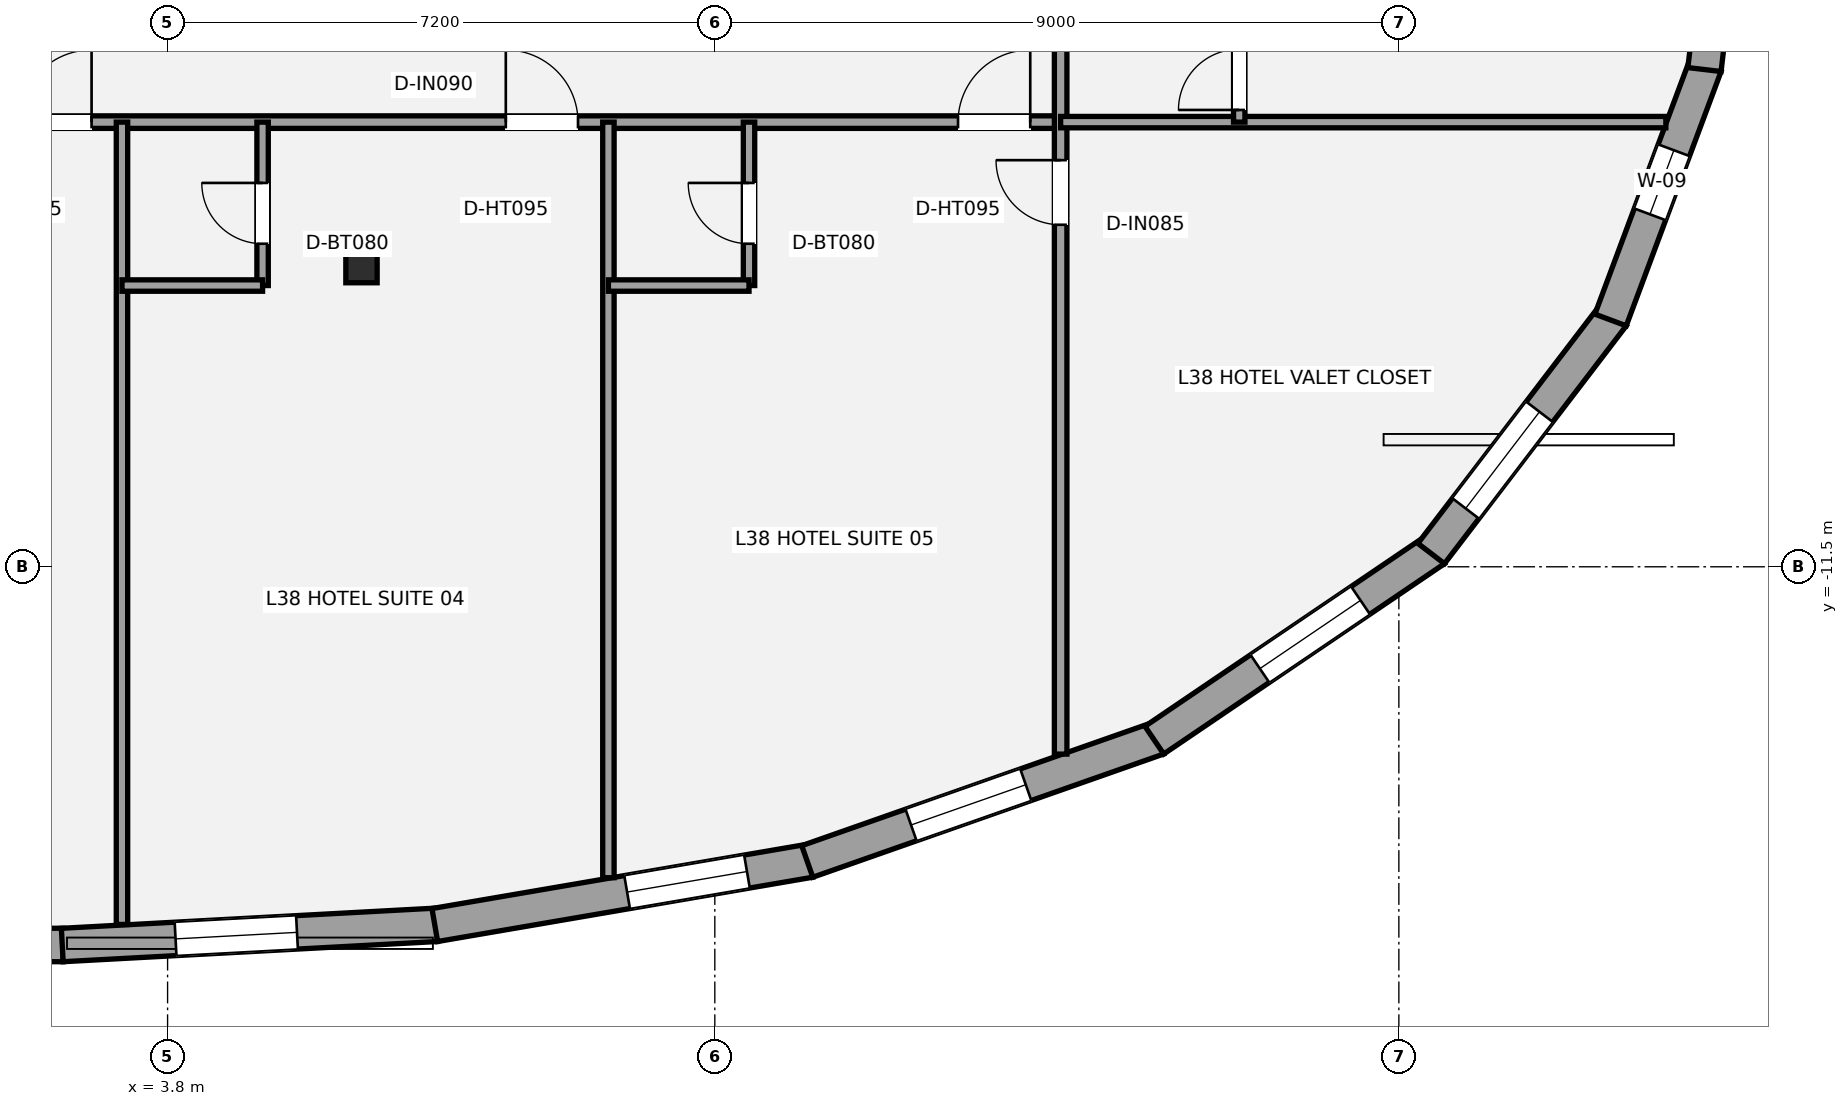
"""IFC4 building model, lengths in metres.
Left out: names, types, materials, properties, quantities, classifications, styles, units other than length and angle.
Written with IfcOpenShell. Run it as: python <this file> out.ifc"""

import sys

from ifc_helpers import new_model, si_unit, direction, frame, frame_2d, origin, origin_2d, place, context, subcontext, project, spatial, rectangle, i_section, extrude, element, fill, save


model = new_model("IFC4")
c1 = context("Model", 3, precision=1e-05, world=origin(), true_north=direction((0.0, 1.0)))
c2 = subcontext(c1, "Body", "Model", "MODEL_VIEW")
j1 = project(units=[si_unit("LENGTHUNIT", "METRE"), si_unit("PLANEANGLEUNIT", "RADIAN")], contexts=[c1])
p1 = place(None, origin())
s1 = spatial("IfcSite", under=j1, at=p1, CompositionType="ELEMENT")
p2 = place(p1, origin())
s2 = spatial("IfcBuilding", under=s1, at=p2, CompositionType="ELEMENT")
p3 = place(p2, frame((0.0, 0.0, 143.8)))
s3 = spatial("IfcBuildingStorey", under=s2, at=p3, CompositionType="ELEMENT", Elevation=143.8)
p4 = place(p3, frame((6.351, -7.546, 0.0), z_axis=(0.0, 0.0, 1.0), x_axis=(1.0, 0.0, 0.0)))
e1 = element("IfcColumn", 1, at=p4, inside=s3, PredefinedType="COLUMN", context=c2, shape_type="SweptSolid", body=[
    extrude(i_section(OverallWidth=0.412, OverallDepth=0.435, WebThickness=0.036, FlangeThickness=0.057, at=origin_2d()), origin(), (0.0, 0.0, 1.0), 3.2),
])
p5 = place(p3, frame((2.426, -16.476, 0.0), z_axis=(0.0, 0.0, 1.0), x_axis=(-1.0, 0.0, 0.0)))
e2 = element("IfcWall", 2, at=p5, inside=s3, PredefinedType="STANDARD", context=c2, shape_type="SweptSolid", body=[
    extrude(rectangle(XDim=4.852, YDim=0.44, at=frame_2d((2.426, 0.0))), origin(), (0.0, 0.0, 1.0), 2.315),
])
p6 = place(p5, frame((1.429, 0.0, 0.58)))
e3 = element("IfcOpeningElement", 3, at=p6, cuts=e2, PredefinedType="OPENING", context=c2, shape_type="SweptSolid", body=[
    extrude(rectangle(XDim=1.6, YDim=1.55, at=frame_2d((0.8, 0.775))), frame((0.0, 0.23, 0.0), z_axis=(0.0, -1.0, 0.0), x_axis=(1.0, 0.0, 0.0)), (0.0, 0.0, 1.0), 0.46),
])
p7 = place(p3, frame((7.341, -16.21, 0.0), z_axis=(0.0, 0.0, 1.0), x_axis=(-0.998547098553, -0.05388591627, 0.0)))
e4 = element("IfcWall", 4, at=p7, inside=s3, PredefinedType="STANDARD", context=c2, shape_type="SweptSolid", body=[
    extrude(rectangle(XDim=4.934, YDim=0.44, at=frame_2d((2.467, 0.0))), origin(), (0.0, 0.0, 1.0), 2.315),
])
p8 = place(p7, frame((1.841, 0.0, 0.58)))
e5 = element("IfcOpeningElement", 5, at=p8, cuts=e4, PredefinedType="OPENING", context=c2, shape_type="SweptSolid", body=[
    extrude(rectangle(XDim=1.6, YDim=1.55, at=frame_2d((0.8, 0.775))), frame((0.0, 0.23, 0.0), z_axis=(0.0, -1.0, 0.0), x_axis=(1.0, 0.0, 0.0)), (0.0, 0.0, 1.0), 0.46),
])
p9 = place(p3, frame((12.252, -15.367, 0.0), z_axis=(0.0, 0.0, 1.0), x_axis=(-0.985640803986, -0.168855575915, 0.0)))
e6 = element("IfcWall", 6, at=p9, inside=s3, PredefinedType="STANDARD", context=c2, shape_type="SweptSolid", body=[
    extrude(rectangle(XDim=5.009, YDim=0.44, at=frame_2d((2.504, 0.0))), origin(), (0.0, 0.0, 1.0), 2.315),
])
p10 = place(p9, frame((0.841, 0.0, 0.58)))
e7 = element("IfcOpeningElement", 7, at=p10, cuts=e6, PredefinedType="OPENING", context=c2, shape_type="SweptSolid", body=[
    extrude(rectangle(XDim=1.6, YDim=1.55, at=frame_2d((0.8, 0.775))), frame((0.0, 0.23, 0.0), z_axis=(0.0, -1.0, 0.0), x_axis=(1.0, 0.0, 0.0)), (0.0, 0.0, 1.0), 0.46),
])
p11 = place(p3, frame((16.833, -13.756, 0.0), z_axis=(0.0, 0.0, 1.0), x_axis=(-0.943528860281, -0.331290340662, 0.0)))
e8 = element("IfcWall", 8, at=p11, inside=s3, PredefinedType="STANDARD", context=c2, shape_type="SweptSolid", body=[
    extrude(rectangle(XDim=4.893, YDim=0.44, at=frame_2d((2.447, 0.0))), origin(), (0.0, 0.0, 1.0), 2.315),
])
p12 = place(p11, frame((1.846, 0.0, 0.58)))
e9 = element("IfcOpeningElement", 9, at=p12, cuts=e8, PredefinedType="OPENING", context=c2, shape_type="SweptSolid", body=[
    extrude(rectangle(XDim=1.6, YDim=1.55, at=frame_2d((0.8, 0.775))), frame((0.0, 0.23, 0.0), z_axis=(0.0, -1.0, 0.0), x_axis=(1.0, 0.0, 0.0)), (0.0, 0.0, 1.0), 0.46),
])
p13 = place(p3, frame((20.477, -11.277, 0.0), z_axis=(0.0, 0.0, 1.0), x_axis=(-0.827741657842, -0.561109390291, 0.0)))
e10 = element("IfcWall", 10, at=p13, inside=s3, PredefinedType="STANDARD", context=c2, shape_type="SweptSolid", body=[
    extrude(rectangle(XDim=4.463, YDim=0.44, at=frame_2d((2.231, 0.0))), origin(), (0.0, 0.0, 1.0), 2.315),
])
p14 = place(p13, frame((1.185, 0.0, 0.58)))
e11 = element("IfcOpeningElement", 11, at=p14, cuts=e10, PredefinedType="OPENING", context=c2, shape_type="SweptSolid", body=[
    extrude(rectangle(XDim=1.6, YDim=1.55, at=frame_2d((0.8, 0.775))), frame((0.0, 0.23, 0.0), z_axis=(0.0, -1.0, 0.0), x_axis=(1.0, 0.0, 0.0)), (0.0, 0.0, 1.0), 0.46),
])
p15 = place(p3, frame((22.817, -8.196, 0.0), z_axis=(0.0, 0.0, 1.0), x_axis=(-0.607215400231, -0.794537260122, 0.0)))
e12 = element("IfcWall", 12, at=p15, inside=s3, PredefinedType="STANDARD", context=c2, shape_type="SweptSolid", body=[
    extrude(rectangle(XDim=3.939, YDim=0.44, at=frame_2d((1.969, 0.0))), origin(), (0.0, 0.0, 1.0), 2.315),
])
p16 = place(p15, frame((1.592, 0.0, 0.58)))
e13 = element("IfcOpeningElement", 13, at=p16, cuts=e12, PredefinedType="OPENING", context=c2, shape_type="SweptSolid", body=[
    extrude(rectangle(XDim=1.6, YDim=1.55, at=frame_2d((0.8, 0.775))), frame((0.0, 0.23, 0.0), z_axis=(0.0, -1.0, 0.0), x_axis=(1.0, 0.0, 0.0)), (0.0, 0.0, 1.0), 0.46),
])
p17 = place(p3, frame((24.033, -4.907, 0.0), z_axis=(0.0, 0.0, 1.0), x_axis=(-0.349422124021, -0.936965409844, 0.0)))
e14 = element("IfcWall", 14, at=p17, inside=s3, PredefinedType="STANDARD", context=c2, shape_type="SweptSolid", body=[
    extrude(rectangle(XDim=3.571, YDim=0.44, at=frame_2d((1.786, 0.0))), origin(), (0.0, 0.0, 1.0), 2.315),
])
p18 = place(p17, frame((1.188, 0.0, 0.58)))
e15 = element("IfcOpeningElement", 15, at=p18, cuts=e14, PredefinedType="OPENING", context=c2, shape_type="SweptSolid", body=[
    extrude(rectangle(XDim=0.9, YDim=1.35, at=frame_2d((0.45, 0.675))), frame((0.0, 0.23, 0.0), z_axis=(0.0, -1.0, 0.0), x_axis=(1.0, 0.0, 0.0)), (0.0, 0.0, 1.0), 0.46),
])
p19 = place(p3, frame((24.413, -1.619, 0.0), z_axis=(0.0, 0.0, 1.0), x_axis=(-0.116605336518, -0.993178330158, 0.0)))
e16 = element("IfcWall", 16, at=p19, inside=s3, PredefinedType="STANDARD", context=c2, shape_type="SweptSolid", body=[
    extrude(rectangle(XDim=3.363, YDim=0.44, at=frame_2d((1.681, 0.0))), origin(), (0.0, 0.0, 1.0), 2.315),
])
p20 = place(p19, frame((1.417, 0.0, 0.58)))
e17 = element("IfcOpeningElement", 17, at=p20, cuts=e16, PredefinedType="OPENING", context=c2, shape_type="SweptSolid", body=[
    extrude(rectangle(XDim=1.6, YDim=1.55, at=frame_2d((0.8, 0.775))), frame((0.0, 0.23, 0.0), z_axis=(0.0, -1.0, 0.0), x_axis=(1.0, 0.0, 0.0)), (0.0, 0.0, 1.0), 0.46),
])
p21 = place(p3, frame((-15.55, -5.65, 0.0), z_axis=(0.0, 0.0, 1.0), x_axis=(1.0, 0.0, 0.0)))
e18 = element("IfcWall", 18, at=p21, inside=s3, PredefinedType="PARTITIONING", context=c2, shape_type="SweptSolid", body=[
    extrude(rectangle(XDim=31.1, YDim=0.165, at=frame_2d((15.55, 0.0))), origin(), (0.0, 0.0, 1.0), 2.398),
])
p22 = place(p21, frame((4.6, 0.0, 0.0)))
e19 = element("IfcOpeningElement", 19, at=p22, cuts=e18, PredefinedType="OPENING", context=c2, shape_type="SweptSolid", body=[
    extrude(rectangle(XDim=0.95, YDim=2.15, at=frame_2d((0.475, 1.075))), frame((0.0, 0.093, 0.0), z_axis=(0.0, -1.0, 0.0), x_axis=(1.0, 0.0, 0.0)), (0.0, 0.0, 1.0), 0.185),
])
p23 = place(p21, frame((11.0, 0.0, 0.0)))
e20 = element("IfcOpeningElement", 20, at=p23, cuts=e18, PredefinedType="OPENING", context=c2, shape_type="SweptSolid", body=[
    extrude(rectangle(XDim=0.95, YDim=2.15, at=frame_2d((0.475, 1.075))), frame((0.0, 0.093, 0.0), z_axis=(0.0, -1.0, 0.0), x_axis=(1.0, 0.0, 0.0)), (0.0, 0.0, 1.0), 0.185),
])
p24 = place(p21, frame((17.4, 0.0, 0.0)))
e21 = element("IfcOpeningElement", 21, at=p24, cuts=e18, PredefinedType="OPENING", context=c2, shape_type="SweptSolid", body=[
    extrude(rectangle(XDim=0.95, YDim=2.15, at=frame_2d((0.475, 1.075))), frame((0.0, 0.093, 0.0), z_axis=(0.0, -1.0, 0.0), x_axis=(1.0, 0.0, 0.0)), (0.0, 0.0, 1.0), 0.185),
])
p25 = place(p21, frame((23.8, 0.0, 0.0)))
e22 = element("IfcOpeningElement", 22, at=p25, cuts=e18, PredefinedType="OPENING", context=c2, shape_type="SweptSolid", body=[
    extrude(rectangle(XDim=0.95, YDim=2.15, at=frame_2d((0.475, 1.075))), frame((0.0, 0.093, 0.0), z_axis=(0.0, -1.0, 0.0), x_axis=(1.0, 0.0, 0.0)), (0.0, 0.0, 1.0), 0.185),
])
p26 = place(p21, frame((29.75, 0.0, 0.0)))
e23 = element("IfcOpeningElement", 23, at=p26, cuts=e18, PredefinedType="OPENING", context=c2, shape_type="SweptSolid", body=[
    extrude(rectangle(XDim=0.95, YDim=2.15, at=frame_2d((0.475, 1.075))), frame((0.0, 0.093, 0.0), z_axis=(0.0, -1.0, 0.0), x_axis=(1.0, 0.0, 0.0)), (0.0, 0.0, 1.0), 0.185),
])
p27 = place(p3, frame((15.55, -13.965, 0.0), z_axis=(0.0, 0.0, 1.0), x_axis=(0.0, 1.0, 0.0)))
e24 = element("IfcWall", 24, at=p27, inside=s3, PredefinedType="PARTITIONING", context=c2, shape_type="SweptSolid", body=[
    extrude(rectangle(XDim=21.515, YDim=0.165, at=frame_2d((10.757, 0.0))), origin(), (0.0, 0.0, 1.0), 2.473),
])
p28 = place(p27, frame((6.964, 0.0, 0.0)))
e25 = element("IfcOpeningElement", 25, at=p28, cuts=e24, PredefinedType="OPENING", context=c2, shape_type="SweptSolid", body=[
    extrude(rectangle(XDim=0.85, YDim=2.1, at=frame_2d((0.425, 1.05))), frame((0.0, 0.093, 0.0), z_axis=(0.0, -1.0, 0.0), x_axis=(1.0, 0.0, 0.0)), (0.0, 0.0, 1.0), 0.185),
])
p29 = place(p27, frame((11.014, 0.0, 0.0)))
e26 = element("IfcOpeningElement", 26, at=p29, cuts=e24, PredefinedType="OPENING", context=c2, shape_type="SweptSolid", body=[
    extrude(rectangle(XDim=0.95, YDim=2.15, at=frame_2d((0.475, 1.075))), frame((0.0, 0.093, 0.0), z_axis=(0.0, -1.0, 0.0), x_axis=(1.0, 0.0, 0.0)), (0.0, 0.0, 1.0), 0.185),
])
p30 = place(p27, frame((15.414, 0.0, 0.0)))
e27 = element("IfcOpeningElement", 27, at=p30, cuts=e24, PredefinedType="OPENING", context=c2, shape_type="SweptSolid", body=[
    extrude(rectangle(XDim=0.95, YDim=2.15, at=frame_2d((0.475, 1.075))), frame((0.0, 0.093, 0.0), z_axis=(0.0, -1.0, 0.0), x_axis=(1.0, 0.0, 0.0)), (0.0, 0.0, 1.0), 0.185),
])
p31 = place(p27, frame((20.165, 0.0, 0.0)))
e28 = element("IfcOpeningElement", 28, at=p31, cuts=e24, PredefinedType="OPENING", context=c2, shape_type="SweptSolid", body=[
    extrude(rectangle(XDim=0.95, YDim=2.15, at=frame_2d((0.475, 1.075))), frame((0.0, 0.093, 0.0), z_axis=(0.0, -1.0, 0.0), x_axis=(1.0, 0.0, 0.0)), (0.0, 0.0, 1.0), 0.185),
])
p32 = place(p3, frame((15.55, -5.65, 0.0), z_axis=(0.0, 0.0, 1.0), x_axis=(1.0, 0.0, 0.0)))
e29 = element("IfcWall", 29, at=p32, inside=s3, PredefinedType="PLUMBINGWALL", context=c2, shape_type="SweptSolid", body=[
    extrude(rectangle(XDim=7.963, YDim=0.15, at=frame_2d((3.981, 0.0))), origin(), (0.0, 0.0, 1.0), 2.473),
])
p33 = place(p3, frame((3.2, -16.205, 0.0), z_axis=(0.0, 0.0, 1.0), x_axis=(0.0, 1.0, 0.0)))
e30 = element("IfcWall", 30, at=p33, inside=s3, PredefinedType="PLUMBINGWALL", context=c2, shape_type="SweptSolid", body=[
    extrude(rectangle(XDim=10.555, YDim=0.15, at=frame_2d((5.278, 0.0))), origin(), (0.0, 0.0, 1.0), 2.473),
])
p34 = place(p3, frame((9.6, -15.591, 0.0), z_axis=(0.0, 0.0, 1.0), x_axis=(0.0, 1.0, 0.0)))
e31 = element("IfcWall", 31, at=p34, inside=s3, PredefinedType="PLUMBINGWALL", context=c2, shape_type="SweptSolid", body=[
    extrude(rectangle(XDim=9.941, YDim=0.15, at=frame_2d((4.97, 0.0))), origin(), (0.0, 0.0, 1.0), 3.02),
])
p35 = place(p3, frame((5.05, -7.8, 0.0), z_axis=(0.0, 0.0, 1.0), x_axis=(0.0, 1.0, 0.0)))
e32 = element("IfcWall", 32, at=p35, inside=s3, PredefinedType="PLUMBINGWALL", context=c2, shape_type="SweptSolid", body=[
    extrude(rectangle(XDim=2.15, YDim=0.15, at=frame_2d((1.075, 0.0))), origin(), (0.0, 0.0, 1.0), 3.02),
])
p36 = place(p35, frame((0.55, 0.0, 0.0)))
e33 = element("IfcOpeningElement", 33, at=p36, cuts=e32, PredefinedType="OPENING", context=c2, shape_type="SweptSolid", body=[
    extrude(rectangle(XDim=0.8, YDim=2.1, at=frame_2d((0.4, 1.05))), frame((0.0, 0.085, 0.0), z_axis=(0.0, -1.0, 0.0), x_axis=(1.0, 0.0, 0.0)), (0.0, 0.0, 1.0), 0.17),
])
p37 = place(p3, frame((3.2, -7.8, 0.0), z_axis=(0.0, 0.0, 1.0), x_axis=(1.0, 0.0, 0.0)))
e34 = element("IfcWall", 34, at=p37, inside=s3, PredefinedType="PLUMBINGWALL", context=c2, shape_type="SweptSolid", body=[
    extrude(rectangle(XDim=1.85, YDim=0.15, at=frame_2d((0.925, 0.0))), origin(), (0.0, 0.0, 1.0), 3.02),
])
p38 = place(p3, frame((11.45, -7.8, 0.0), z_axis=(0.0, 0.0, 1.0), x_axis=(0.0, 1.0, 0.0)))
e35 = element("IfcWall", 35, at=p38, inside=s3, PredefinedType="PLUMBINGWALL", context=c2, shape_type="SweptSolid", body=[
    extrude(rectangle(XDim=2.15, YDim=0.15, at=frame_2d((1.075, 0.0))), origin(), (0.0, 0.0, 1.0), 3.02),
])
p39 = place(p38, frame((0.55, 0.0, 0.0)))
e36 = element("IfcOpeningElement", 36, at=p39, cuts=e35, PredefinedType="OPENING", context=c2, shape_type="SweptSolid", body=[
    extrude(rectangle(XDim=0.8, YDim=2.1, at=frame_2d((0.4, 1.05))), frame((0.0, 0.085, 0.0), z_axis=(0.0, -1.0, 0.0), x_axis=(1.0, 0.0, 0.0)), (0.0, 0.0, 1.0), 0.17),
])
p40 = place(p3, frame((9.6, -7.8, 0.0), z_axis=(0.0, 0.0, 1.0), x_axis=(1.0, 0.0, 0.0)))
e37 = element("IfcWall", 37, at=p40, inside=s3, PredefinedType="PLUMBINGWALL", context=c2, shape_type="SweptSolid", body=[
    extrude(rectangle(XDim=1.85, YDim=0.15, at=frame_2d((0.925, 0.0))), origin(), (0.0, 0.0, 1.0), 2.473),
])
p41 = place(p3, frame((17.9, -5.65, 0.0), z_axis=(0.0, 0.0, 1.0), x_axis=(0.0, 1.0, 0.0)))
e38 = element("IfcWall", 38, at=p41, inside=s3, PredefinedType="PLUMBINGWALL", context=c2, shape_type="SweptSolid", body=[
    extrude(rectangle(XDim=2.15, YDim=0.15, at=frame_2d((1.075, 0.0))), origin(), (0.0, 0.0, 1.0), 2.473),
])
p42 = place(p41, frame((0.16, 0.0, 0.0)))
e39 = element("IfcOpeningElement", 39, at=p42, cuts=e38, PredefinedType="OPENING", context=c2, shape_type="SweptSolid", body=[
    extrude(rectangle(XDim=0.8, YDim=2.1, at=frame_2d((0.4, 1.05))), frame((0.0, 0.085, 0.0), z_axis=(0.0, -1.0, 0.0), x_axis=(1.0, 0.0, 0.0)), (0.0, 0.0, 1.0), 0.17),
])
p43 = place(p8, origin())
e40 = element("IfcWindow", 40, at=p43, inside=s3, PartitioningType="SINGLE_PANEL", PredefinedType="WINDOW", context=c2, shape_type="SweptSolid", body=[
    extrude(rectangle(XDim=1.6, YDim=1.55, at=frame_2d((0.8, 0.775))), frame((0.0, -0.01, 0.0), z_axis=(0.0, -1.0, 0.0), x_axis=(1.0, 0.0, 0.0)), (0.0, 0.0, 1.0), 0.06),
])
fill(e5, e40)
p44 = place(p10, origin())
e41 = element("IfcWindow", 41, at=p44, inside=s3, PartitioningType="SINGLE_PANEL", PredefinedType="WINDOW", context=c2, shape_type="SweptSolid", body=[
    extrude(rectangle(XDim=1.6, YDim=1.55, at=frame_2d((0.8, 0.775))), frame((0.0, -0.01, 0.0), z_axis=(0.0, -1.0, 0.0), x_axis=(1.0, 0.0, 0.0)), (0.0, 0.0, 1.0), 0.06),
])
fill(e7, e41)
p45 = place(p12, origin())
e42 = element("IfcWindow", 42, at=p45, inside=s3, PartitioningType="SINGLE_PANEL", PredefinedType="WINDOW", context=c2, shape_type="SweptSolid", body=[
    extrude(rectangle(XDim=1.6, YDim=1.55, at=frame_2d((0.8, 0.775))), frame((0.0, -0.01, 0.0), z_axis=(0.0, -1.0, 0.0), x_axis=(1.0, 0.0, 0.0)), (0.0, 0.0, 1.0), 0.06),
])
fill(e9, e42)
p46 = place(p14, origin())
e43 = element("IfcWindow", 43, at=p46, inside=s3, PartitioningType="SINGLE_PANEL", PredefinedType="WINDOW", context=c2, shape_type="SweptSolid", body=[
    extrude(rectangle(XDim=1.6, YDim=1.55, at=frame_2d((0.8, 0.775))), frame((0.0, -0.01, 0.0), z_axis=(0.0, -1.0, 0.0), x_axis=(1.0, 0.0, 0.0)), (0.0, 0.0, 1.0), 0.06),
])
fill(e11, e43)
p47 = place(p16, origin())
e44 = element("IfcWindow", 44, at=p47, inside=s3, PartitioningType="SINGLE_PANEL", PredefinedType="WINDOW", context=c2, shape_type="SweptSolid", body=[
    extrude(rectangle(XDim=1.6, YDim=1.55, at=frame_2d((0.8, 0.775))), frame((0.0, -0.01, 0.0), z_axis=(0.0, -1.0, 0.0), x_axis=(1.0, 0.0, 0.0)), (0.0, 0.0, 1.0), 0.06),
])
fill(e13, e44)
p48 = place(p18, origin())
e45 = element("IfcWindow", 45, at=p48, inside=s3, PartitioningType="SINGLE_PANEL", PredefinedType="WINDOW", context=c2, shape_type="SweptSolid", body=[
    extrude(rectangle(XDim=0.9, YDim=1.35, at=frame_2d((0.45, 0.675))), frame((0.0, -0.01, 0.0), z_axis=(0.0, -1.0, 0.0), x_axis=(1.0, 0.0, 0.0)), (0.0, 0.0, 1.0), 0.06),
])
fill(e15, e45)
p49 = place(p28, origin())
e46 = element("IfcDoor", 46, at=p49, inside=s3, OperationType="SINGLE_SWING_RIGHT", PredefinedType="DOOR", context=c2, shape_type="SweptSolid", body=[
    extrude(rectangle(XDim=0.85, YDim=2.1, at=frame_2d((0.425, 1.05))), frame((0.0, 0.025, 0.0), z_axis=(0.0, -1.0, 0.0), x_axis=(1.0, 0.0, 0.0)), (0.0, 0.0, 1.0), 0.05),
])
fill(e25, e46)
p50 = place(p24, origin())
e47 = element("IfcDoor", 47, at=p50, inside=s3, OperationType="SINGLE_SWING_RIGHT", PredefinedType="DOOR", context=c2, shape_type="SweptSolid", body=[
    extrude(rectangle(XDim=0.95, YDim=2.15, at=frame_2d((0.475, 1.075))), frame((0.0, 0.025, 0.0), z_axis=(0.0, -1.0, 0.0), x_axis=(1.0, 0.0, 0.0)), (0.0, 0.0, 1.0), 0.05),
])
fill(e21, e47)
p51 = place(p25, origin())
e48 = element("IfcDoor", 48, at=p51, inside=s3, OperationType="SINGLE_SWING_LEFT", PredefinedType="DOOR", context=c2, shape_type="SweptSolid", body=[
    extrude(rectangle(XDim=0.95, YDim=2.15, at=frame_2d((0.475, 1.075))), frame((0.0, 0.025, 0.0), z_axis=(0.0, -1.0, 0.0), x_axis=(1.0, 0.0, 0.0)), (0.0, 0.0, 1.0), 0.05),
])
fill(e22, e48)
p52 = place(p36, origin())
e49 = element("IfcDoor", 49, at=p52, inside=s3, OperationType="SINGLE_SWING_RIGHT", PredefinedType="DOOR", context=c2, shape_type="SweptSolid", body=[
    extrude(rectangle(XDim=0.8, YDim=2.1, at=frame_2d((0.4, 1.05))), frame((0.0, 0.025, 0.0), z_axis=(0.0, -1.0, 0.0), x_axis=(1.0, 0.0, 0.0)), (0.0, 0.0, 1.0), 0.05),
])
fill(e33, e49)
p53 = place(p26, origin())
e50 = element("IfcDoor", 50, at=p53, inside=s3, OperationType="SINGLE_SWING_RIGHT", PredefinedType="DOOR", context=c2, shape_type="SweptSolid", body=[
    extrude(rectangle(XDim=0.95, YDim=2.15, at=frame_2d((0.475, 1.075))), frame((0.0, 0.025, 0.0), z_axis=(0.0, -1.0, 0.0), x_axis=(1.0, 0.0, 0.0)), (0.0, 0.0, 1.0), 0.05),
])
fill(e23, e50)
p54 = place(p39, origin())
e51 = element("IfcDoor", 51, at=p54, inside=s3, OperationType="SINGLE_SWING_RIGHT", PredefinedType="DOOR", context=c2, shape_type="SweptSolid", body=[
    extrude(rectangle(XDim=0.8, YDim=2.1, at=frame_2d((0.4, 1.05))), frame((0.0, 0.025, 0.0), z_axis=(0.0, -1.0, 0.0), x_axis=(1.0, 0.0, 0.0)), (0.0, 0.0, 1.0), 0.05),
])
fill(e36, e51)
p55 = place(p42, origin())
e52 = element("IfcDoor", 52, at=p55, inside=s3, OperationType="SINGLE_SWING_LEFT", PredefinedType="DOOR", context=c2, shape_type="SweptSolid", body=[
    extrude(rectangle(XDim=0.8, YDim=2.1, at=frame_2d((0.4, 1.05))), frame((0.0, 0.025, 0.0), z_axis=(0.0, -1.0, 0.0), x_axis=(1.0, 0.0, 0.0)), (0.0, 0.0, 1.0), 0.05),
])
fill(e39, e52)
save(model, sys.argv[1])
